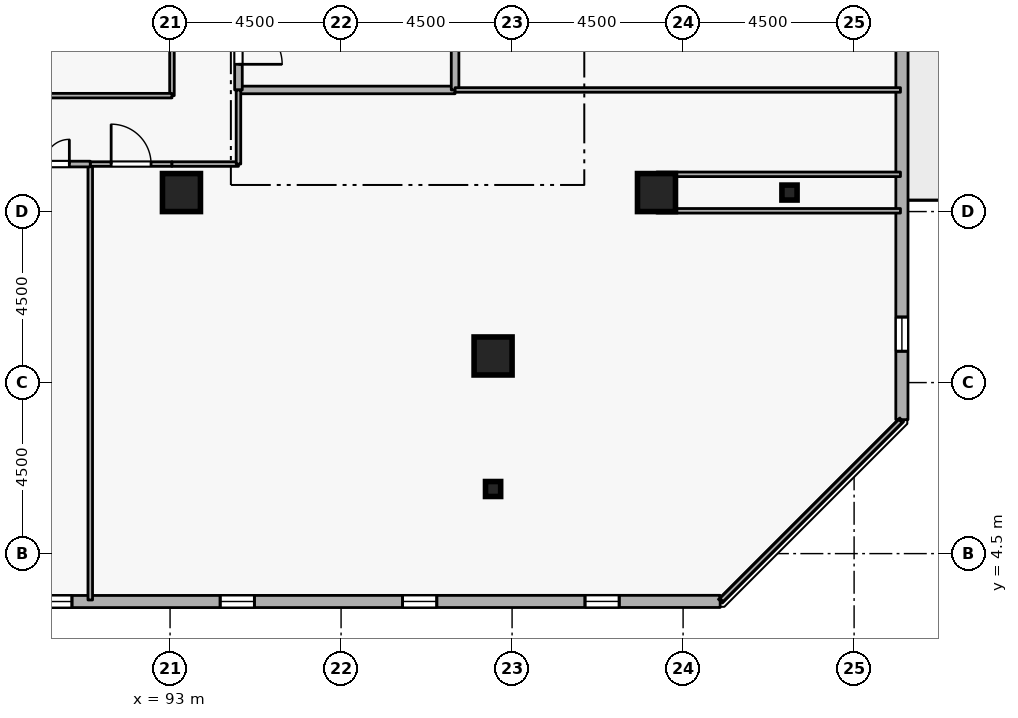
"""IFC4 building model, lengths in metres.
Left out: names, types, materials, properties, quantities, classifications, styles, units other than length and angle.
Written with IfcOpenShell. Run it as: python <this file> out.ifc"""

import sys

from ifc_helpers import new_model, si_unit, direction, frame, frame_2d, origin, origin_2d, place, context, subcontext, project, spatial, rectangle, i_section, extrude, element, fill, save


model = new_model("IFC4")
c1 = context("Model", 3, precision=1e-05, world=origin(), true_north=direction((0.0, 1.0)))
c2 = subcontext(c1, "Body", "Model", "MODEL_VIEW")
j1 = project(units=[si_unit("LENGTHUNIT", "METRE"), si_unit("PLANEANGLEUNIT", "RADIAN")], contexts=[c1])
p1 = place(None, origin())
s1 = spatial("IfcSite", under=j1, at=p1, CompositionType="ELEMENT")
p2 = place(p1, origin())
s2 = spatial("IfcBuilding", under=s1, at=p2, CompositionType="ELEMENT")
p3 = place(p2, frame((0.0, 0.0, 247.5)))
s3 = spatial("IfcBuildingStorey", under=s2, at=p3, CompositionType="ELEMENT", Elevation=247.5)
for number, where, z_axis, x_axis in (
    (1, (105.8, 14.0, 0.0), (0.0, 0.0, 1.0), (1.0, 0.0, 0.0)),
    (2, (101.5, 9.7, 0.0), (0.0, 0.0, 1.0), (1.0, 0.0, 0.0)),
    (3, (93.3, 14.0, 0.0), (0.0, 0.0, 1.0), (1.0, 0.0, 0.0)),
):
    element("IfcColumn", number, at=place(p3, frame(where, z_axis=z_axis, x_axis=x_axis)), inside=s3, PredefinedType="COLUMN", context=c2, shape_type="SweptSolid", body=[
        extrude(rectangle(XDim=1.0, YDim=1.0, at=origin_2d()), origin(), (0.0, 0.0, 1.0), 3.6),
    ])
for number, where, z_axis, x_axis in (
    (4, (109.3, 14.0, 0.0), (0.0, 0.0, 1.0), (1.0, 0.0, 0.0)),
    (5, (101.5, 6.2, 0.0), (0.0, 0.0, 1.0), (1.0, 0.0, 0.0)),
):
    element("IfcColumn", number, at=place(p3, frame(where, z_axis=z_axis, x_axis=x_axis)), inside=s3, PredefinedType="COLUMN", context=c2, shape_type="SweptSolid", body=[
        extrude(i_section(OverallWidth=0.399, OverallDepth=0.394, WebThickness=0.023, FlangeThickness=0.037, FilletRadius=0.015, at=origin_2d()), origin(), (0.0, 0.0, 1.0), 3.6),
    ])
p4 = place(p3, frame((73.319, 3.235, 0.0), z_axis=(0.0, 0.0, 1.0), x_axis=(0.99999997701, 0.000214431216, 0.0)))
e6 = element("IfcWall", 6, at=p4, inside=s3, PredefinedType="STANDARD", context=c2, shape_type="SweptSolid", body=[
    extrude(rectangle(XDim=34.156, YDim=0.32, at=frame_2d((17.078, 0.0))), origin(), (0.0, 0.0, 1.0), 2.7),
])
p5 = place(p4, frame((1.8, 0.0, 0.72)))
e7 = element("IfcOpeningElement", 7, at=p5, cuts=e6, PredefinedType="OPENING", context=c2, shape_type="SweptSolid", body=[
    extrude(rectangle(XDim=0.9, YDim=1.75, at=frame_2d((0.45, 0.875))), frame((0.0, 0.17, 0.0), z_axis=(0.0, -1.0, 0.0), x_axis=(1.0, 0.0, 0.0)), (0.0, 0.0, 1.0), 0.34),
])
p6 = place(p4, frame((6.6, 0.0, 0.72)))
e8 = element("IfcOpeningElement", 8, at=p6, cuts=e6, PredefinedType="OPENING", context=c2, shape_type="SweptSolid", body=[
    extrude(rectangle(XDim=0.9, YDim=1.75, at=frame_2d((0.45, 0.875))), frame((0.0, 0.17, 0.0), z_axis=(0.0, -1.0, 0.0), x_axis=(1.0, 0.0, 0.0)), (0.0, 0.0, 1.0), 0.34),
])
p7 = place(p4, frame((11.4, 0.0, 0.72)))
e9 = element("IfcOpeningElement", 9, at=p7, cuts=e6, PredefinedType="OPENING", context=c2, shape_type="SweptSolid", body=[
    extrude(rectangle(XDim=0.9, YDim=1.75, at=frame_2d((0.45, 0.875))), frame((0.0, 0.17, 0.0), z_axis=(0.0, -1.0, 0.0), x_axis=(1.0, 0.0, 0.0)), (0.0, 0.0, 1.0), 0.34),
])
p8 = place(p4, frame((16.2, 0.0, 0.72)))
e10 = element("IfcOpeningElement", 10, at=p8, cuts=e6, PredefinedType="OPENING", context=c2, shape_type="SweptSolid", body=[
    extrude(rectangle(XDim=0.9, YDim=1.75, at=frame_2d((0.45, 0.875))), frame((0.0, 0.17, 0.0), z_axis=(0.0, -1.0, 0.0), x_axis=(1.0, 0.0, 0.0)), (0.0, 0.0, 1.0), 0.34),
])
p9 = place(p4, frame((21.0, 0.0, 0.72)))
e11 = element("IfcOpeningElement", 11, at=p9, cuts=e6, PredefinedType="OPENING", context=c2, shape_type="SweptSolid", body=[
    extrude(rectangle(XDim=0.9, YDim=1.75, at=frame_2d((0.45, 0.875))), frame((0.0, 0.17, 0.0), z_axis=(0.0, -1.0, 0.0), x_axis=(1.0, 0.0, 0.0)), (0.0, 0.0, 1.0), 0.34),
])
p10 = place(p4, frame((25.8, 0.0, 0.72)))
e12 = element("IfcOpeningElement", 12, at=p10, cuts=e6, PredefinedType="OPENING", context=c2, shape_type="SweptSolid", body=[
    extrude(rectangle(XDim=0.9, YDim=1.75, at=frame_2d((0.45, 0.875))), frame((0.0, 0.17, 0.0), z_axis=(0.0, -1.0, 0.0), x_axis=(1.0, 0.0, 0.0)), (0.0, 0.0, 1.0), 0.34),
])
p11 = place(p4, frame((30.6, 0.0, 0.72)))
e13 = element("IfcOpeningElement", 13, at=p11, cuts=e6, PredefinedType="OPENING", context=c2, shape_type="SweptSolid", body=[
    extrude(rectangle(XDim=0.9, YDim=1.75, at=frame_2d((0.45, 0.875))), frame((0.0, 0.17, 0.0), z_axis=(0.0, -1.0, 0.0), x_axis=(1.0, 0.0, 0.0)), (0.0, 0.0, 1.0), 0.34),
])
p12 = place(p3, frame((112.257, 8.025, 0.0), z_axis=(0.0, 0.0, 1.0), x_axis=(0.000214431216, 0.99999997701, 0.0)))
e14 = element("IfcWall", 14, at=p12, inside=s3, PredefinedType="STANDARD", context=c2, shape_type="SweptSolid", body=[
    extrude(rectangle(XDim=34.156, YDim=0.32, at=frame_2d((17.078, 0.0))), origin(), (0.0, 0.0, 1.0), 2.7),
])
p13 = place(p12, frame((27.428, 0.0, 0.0)))
e15 = element("IfcOpeningElement", 15, at=p13, cuts=e14, PredefinedType="OPENING", context=c2, shape_type="SweptSolid", body=[
    extrude(rectangle(XDim=1.0, YDim=2.08, at=frame_2d((0.5, 1.04))), frame((0.0, 0.17, 0.0), z_axis=(0.0, -1.0, 0.0), x_axis=(1.0, 0.0, 0.0)), (0.0, 0.0, 1.0), 0.34),
])
p14 = place(p12, frame((1.8, 0.0, 0.72)))
e16 = element("IfcOpeningElement", 16, at=p14, cuts=e14, PredefinedType="OPENING", context=c2, shape_type="SweptSolid", body=[
    extrude(rectangle(XDim=0.9, YDim=1.75, at=frame_2d((0.45, 0.875))), frame((0.0, 0.17, 0.0), z_axis=(0.0, -1.0, 0.0), x_axis=(1.0, 0.0, 0.0)), (0.0, 0.0, 1.0), 0.34),
])
p15 = place(p12, frame((11.4, 0.0, 0.72)))
e17 = element("IfcOpeningElement", 17, at=p15, cuts=e14, PredefinedType="OPENING", context=c2, shape_type="SweptSolid", body=[
    extrude(rectangle(XDim=0.9, YDim=1.75, at=frame_2d((0.45, 0.875))), frame((0.0, 0.17, 0.0), z_axis=(0.0, -1.0, 0.0), x_axis=(1.0, 0.0, 0.0)), (0.0, 0.0, 1.0), 0.34),
])
p16 = place(p12, frame((16.2, 0.0, 0.72)))
e18 = element("IfcOpeningElement", 18, at=p16, cuts=e14, PredefinedType="OPENING", context=c2, shape_type="SweptSolid", body=[
    extrude(rectangle(XDim=0.9, YDim=1.75, at=frame_2d((0.45, 0.875))), frame((0.0, 0.17, 0.0), z_axis=(0.0, -1.0, 0.0), x_axis=(1.0, 0.0, 0.0)), (0.0, 0.0, 1.0), 0.34),
])
p17 = place(p12, frame((21.0, 0.0, 0.72)))
e19 = element("IfcOpeningElement", 19, at=p17, cuts=e14, PredefinedType="OPENING", context=c2, shape_type="SweptSolid", body=[
    extrude(rectangle(XDim=0.9, YDim=1.75, at=frame_2d((0.45, 0.875))), frame((0.0, 0.17, 0.0), z_axis=(0.0, -1.0, 0.0), x_axis=(1.0, 0.0, 0.0)), (0.0, 0.0, 1.0), 0.34),
])
p18 = place(p3, frame((94.8, 16.7, 0.0), z_axis=(0.0, 0.0, 1.0), x_axis=(1.0, 0.0, 0.0)))
e20 = element("IfcWall", 20, at=p18, inside=s3, PredefinedType="STANDARD", context=c2, shape_type="SweptSolid", body=[
    extrude(rectangle(XDim=5.7, YDim=0.2, at=frame_2d((2.85, 0.0))), origin(), (0.0, 0.0, 1.0), 3.34),
])
p19 = place(p3, frame((100.5, 16.7, 0.0), z_axis=(0.0, 0.0, 1.0), x_axis=(0.0, 1.0, 0.0)))
e21 = element("IfcWall", 21, at=p19, inside=s3, PredefinedType="STANDARD", context=c2, shape_type="SweptSolid", body=[
    extrude(rectangle(XDim=2.5, YDim=0.2, at=frame_2d((1.25, 0.0))), origin(), (0.0, 0.0, 1.0), 3.34),
])
p20 = place(p3, frame((94.8, 19.2, 0.0), z_axis=(0.0, 0.0, 1.0), x_axis=(0.0, -1.0, 0.0)))
e22 = element("IfcWall", 22, at=p20, inside=s3, PredefinedType="STANDARD", context=c2, shape_type="SweptSolid", body=[
    extrude(rectangle(XDim=2.5, YDim=0.2, at=frame_2d((1.25, 0.0))), origin(), (0.0, 0.0, 1.0), 3.34),
])
p21 = place(p20, frame((0.675, 0.0, 0.0)))
e23 = element("IfcOpeningElement", 23, at=p21, cuts=e22, PredefinedType="OPENING", context=c2, shape_type="SweptSolid", body=[
    extrude(rectangle(XDim=1.15, YDim=2.1, at=frame_2d((0.575, 1.05))), frame((0.0, 0.11, 0.0), z_axis=(0.0, -1.0, 0.0), x_axis=(1.0, 0.0, 0.0)), (0.0, 0.0, 1.0), 0.22),
])
p22 = place(p3, frame((90.9, 3.28, 0.0), z_axis=(0.0, 0.0, 1.0), x_axis=(0.0, 1.0, 0.0)))
e24 = element("IfcWall", 24, at=p22, inside=s3, PredefinedType="PARTITIONING", context=c2, shape_type="SweptSolid", body=[
    extrude(rectangle(XDim=11.47, YDim=0.12, at=frame_2d((5.735, 0.0))), origin(), (0.0, 0.0, 1.0), 3.34),
])
p23 = place(p3, frame((90.9, 14.75, 0.0), z_axis=(0.0, 0.0, 1.0), x_axis=(1.0, 0.0, 0.0)))
e25 = element("IfcWall", 25, at=p23, inside=s3, PredefinedType="PARTITIONING", context=c2, shape_type="SweptSolid", body=[
    extrude(rectangle(XDim=2.15, YDim=0.12, at=frame_2d((1.075, 0.0))), origin(), (0.0, 0.0, 1.0), 3.34),
])
p24 = place(p23, frame((0.55, 0.0, 0.0)))
e26 = element("IfcOpeningElement", 26, at=p24, cuts=e25, PredefinedType="OPENING", context=c2, shape_type="SweptSolid", body=[
    extrude(rectangle(XDim=1.05, YDim=2.1, at=frame_2d((0.525, 1.05))), frame((0.0, 0.07, 0.0), z_axis=(0.0, -1.0, 0.0), x_axis=(1.0, 0.0, 0.0)), (0.0, 0.0, 1.0), 0.14),
])
p25 = place(p3, frame((93.05, 14.75, 0.0), z_axis=(0.0, 0.0, 1.0), x_axis=(1.0, 0.0, 0.0)))
e27 = element("IfcWall", 27, at=p25, inside=s3, PredefinedType="PARTITIONING", context=c2, shape_type="SweptSolid", body=[
    extrude(rectangle(XDim=1.75, YDim=0.12, at=frame_2d((0.875, 0.0))), origin(), (0.0, 0.0, 1.0), 3.34),
])
p26 = place(p3, frame((94.8, 14.75, 0.0), z_axis=(0.0, 0.0, 1.0), x_axis=(0.0, 1.0, 0.0)))
e28 = element("IfcWall", 28, at=p26, inside=s3, PredefinedType="PARTITIONING", context=c2, shape_type="SweptSolid", body=[
    extrude(rectangle(XDim=1.95, YDim=0.12, at=frame_2d((0.975, 0.0))), origin(), (0.0, 0.0, 1.0), 3.34),
])
p27 = place(p3, frame((100.5, 16.7, 0.0), z_axis=(0.0, 0.0, 1.0), x_axis=(1.0, 0.0, 0.0)))
e29 = element("IfcWall", 29, at=p27, inside=s3, PredefinedType="PARTITIONING", context=c2, shape_type="SweptSolid", body=[
    extrude(rectangle(XDim=11.72, YDim=0.12, at=frame_2d((5.86, 0.0))), origin(), (0.0, 0.0, 1.0), 3.34),
])
p28 = place(p3, frame((112.22, 14.48, 0.0), z_axis=(0.0, 0.0, 1.0), x_axis=(-1.0, 0.0, 0.0)))
e30 = element("IfcWall", 30, at=p28, inside=s3, PredefinedType="PARTITIONING", context=c2, shape_type="SweptSolid", body=[
    extrude(rectangle(XDim=6.42, YDim=0.12, at=frame_2d((3.21, 0.0))), origin(), (0.0, 0.0, 1.0), 3.34),
])
p29 = place(p3, frame((105.8, 13.52, 0.0), z_axis=(0.0, 0.0, 1.0), x_axis=(1.0, 0.0, 0.0)))
e31 = element("IfcWall", 31, at=p29, inside=s3, PredefinedType="PARTITIONING", context=c2, shape_type="SweptSolid", body=[
    extrude(rectangle(XDim=6.42, YDim=0.12, at=frame_2d((3.21, 0.0))), origin(), (0.0, 0.0, 1.0), 2.895),
])
p30 = place(p3, frame((112.22, 7.99, 0.0), z_axis=(0.0, 0.0, 1.0), x_axis=(-0.707106781187, -0.707106781187, 0.0)))
e32 = element("IfcWall", 32, at=p30, inside=s3, PredefinedType="PARTITIONING", context=c2, shape_type="SweptSolid", body=[
    extrude(rectangle(XDim=6.66, YDim=0.12, at=frame_2d((3.33, 0.0))), origin(), (0.0, 0.0, 1.0), 3.34),
])
p31 = place(p3, frame((88.5, 14.75, 0.0), z_axis=(0.0, 0.0, 1.0), x_axis=(1.0, 0.0, 0.0)))
e33 = element("IfcWall", 33, at=p31, inside=s3, PredefinedType="PARTITIONING", context=c2, shape_type="SweptSolid", body=[
    extrude(rectangle(XDim=2.4, YDim=0.15, at=frame_2d((1.2, 0.0))), origin(), (0.0, 0.0, 1.0), 3.34),
])
p32 = place(p31, frame((0.55, 0.0, 0.0)))
e34 = element("IfcOpeningElement", 34, at=p32, cuts=e33, PredefinedType="OPENING", context=c2, shape_type="SweptSolid", body=[
    extrude(rectangle(XDim=1.3, YDim=2.12, at=frame_2d((0.65, 1.06))), frame((0.0, 0.085, 0.0), z_axis=(0.0, -1.0, 0.0), x_axis=(1.0, 0.0, 0.0)), (0.0, 0.0, 1.0), 0.17),
])
p33 = place(p3, frame((93.05, 22.4, 0.0), z_axis=(0.0, 0.0, 1.0), x_axis=(0.0, -1.0, 0.0)))
e35 = element("IfcWall", 35, at=p33, inside=s3, PredefinedType="PARTITIONING", context=c2, shape_type="SweptSolid", body=[
    extrude(rectangle(XDim=5.85, YDim=0.12, at=frame_2d((2.925, 0.0))), origin(), (0.0, 0.0, 1.0), 3.34),
])
p34 = place(p33, frame((2.45, 0.0, 0.0)))
e36 = element("IfcOpeningElement", 36, at=p34, cuts=e35, PredefinedType="OPENING", context=c2, shape_type="SweptSolid", body=[
    extrude(rectangle(XDim=0.95, YDim=2.1, at=frame_2d((0.475, 1.05))), frame((0.0, 0.07, 0.0), z_axis=(0.0, -1.0, 0.0), x_axis=(1.0, 0.0, 0.0)), (0.0, 0.0, 1.0), 0.14),
])
p35 = place(p3, frame((93.05, 16.55, 0.0), z_axis=(0.0, 0.0, 1.0), x_axis=(-1.0, 0.0, 0.0)))
e37 = element("IfcWall", 37, at=p35, inside=s3, PredefinedType="PARTITIONING", context=c2, shape_type="SweptSolid", body=[
    extrude(rectangle(XDim=3.75, YDim=0.12, at=frame_2d((1.875, 0.0))), origin(), (0.0, 0.0, 1.0), 3.34),
])
p36 = place(p8, origin())
e38 = element("IfcWindow", 38, at=p36, inside=s3, PartitioningType="SINGLE_PANEL", PredefinedType="WINDOW", context=c2, shape_type="SweptSolid", body=[
    extrude(rectangle(XDim=0.9, YDim=1.75, at=frame_2d((0.45, 0.875))), frame((0.0, 0.03, 0.0), z_axis=(0.0, -1.0, 0.0), x_axis=(1.0, 0.0, 0.0)), (0.0, 0.0, 1.0), 0.06),
])
fill(e10, e38)
p37 = place(p9, origin())
e39 = element("IfcWindow", 39, at=p37, inside=s3, PartitioningType="SINGLE_PANEL", PredefinedType="WINDOW", context=c2, shape_type="SweptSolid", body=[
    extrude(rectangle(XDim=0.9, YDim=1.75, at=frame_2d((0.45, 0.875))), frame((0.0, 0.03, 0.0), z_axis=(0.0, -1.0, 0.0), x_axis=(1.0, 0.0, 0.0)), (0.0, 0.0, 1.0), 0.06),
])
fill(e11, e39)
p38 = place(p10, origin())
e40 = element("IfcWindow", 40, at=p38, inside=s3, PartitioningType="SINGLE_PANEL", PredefinedType="WINDOW", context=c2, shape_type="SweptSolid", body=[
    extrude(rectangle(XDim=0.9, YDim=1.75, at=frame_2d((0.45, 0.875))), frame((0.0, 0.03, 0.0), z_axis=(0.0, -1.0, 0.0), x_axis=(1.0, 0.0, 0.0)), (0.0, 0.0, 1.0), 0.06),
])
fill(e12, e40)
p39 = place(p11, origin())
e41 = element("IfcWindow", 41, at=p39, inside=s3, PartitioningType="SINGLE_PANEL", PredefinedType="WINDOW", context=c2, shape_type="SweptSolid", body=[
    extrude(rectangle(XDim=0.9, YDim=1.75, at=frame_2d((0.45, 0.875))), frame((0.0, 0.03, 0.0), z_axis=(0.0, -1.0, 0.0), x_axis=(1.0, 0.0, 0.0)), (0.0, 0.0, 1.0), 0.06),
])
fill(e13, e41)
p40 = place(p14, origin())
e42 = element("IfcWindow", 42, at=p40, inside=s3, PartitioningType="SINGLE_PANEL", PredefinedType="WINDOW", context=c2, shape_type="SweptSolid", body=[
    extrude(rectangle(XDim=0.9, YDim=1.75, at=frame_2d((0.45, 0.875))), frame((0.0, 0.03, 0.0), z_axis=(0.0, -1.0, 0.0), x_axis=(1.0, 0.0, 0.0)), (0.0, 0.0, 1.0), 0.06),
])
fill(e16, e42)
p41 = place(p21, origin())
e43 = element("IfcDoor", 43, at=p41, inside=s3, OperationType="SINGLE_SWING_RIGHT", PredefinedType="DOOR", context=c2, shape_type="SweptSolid", body=[
    extrude(rectangle(XDim=1.15, YDim=2.1, at=frame_2d((0.575, 1.05))), frame((0.0, 0.025, 0.0), z_axis=(0.0, -1.0, 0.0), x_axis=(1.0, 0.0, 0.0)), (0.0, 0.0, 1.0), 0.05),
])
fill(e23, e43)
p42 = place(p24, origin())
e44 = element("IfcDoor", 44, at=p42, inside=s3, OperationType="SINGLE_SWING_LEFT", PredefinedType="DOOR", context=c2, shape_type="SweptSolid", body=[
    extrude(rectangle(XDim=1.05, YDim=2.1, at=frame_2d((0.525, 1.05))), frame((0.0, 0.025, 0.0), z_axis=(0.0, -1.0, 0.0), x_axis=(1.0, 0.0, 0.0)), (0.0, 0.0, 1.0), 0.05),
])
fill(e26, e44)
p43 = place(p32, origin())
e45 = element("IfcDoor", 45, at=p43, inside=s3, OperationType="DOUBLE_DOOR_SINGLE_SWING", PredefinedType="DOOR", context=c2, shape_type="SweptSolid", body=[
    extrude(rectangle(XDim=1.3, YDim=2.12, at=frame_2d((0.65, 1.06))), frame((0.0, 0.025, 0.0), z_axis=(0.0, -1.0, 0.0), x_axis=(1.0, 0.0, 0.0)), (0.0, 0.0, 1.0), 0.05),
])
fill(e34, e45)
save(model, sys.argv[1])
